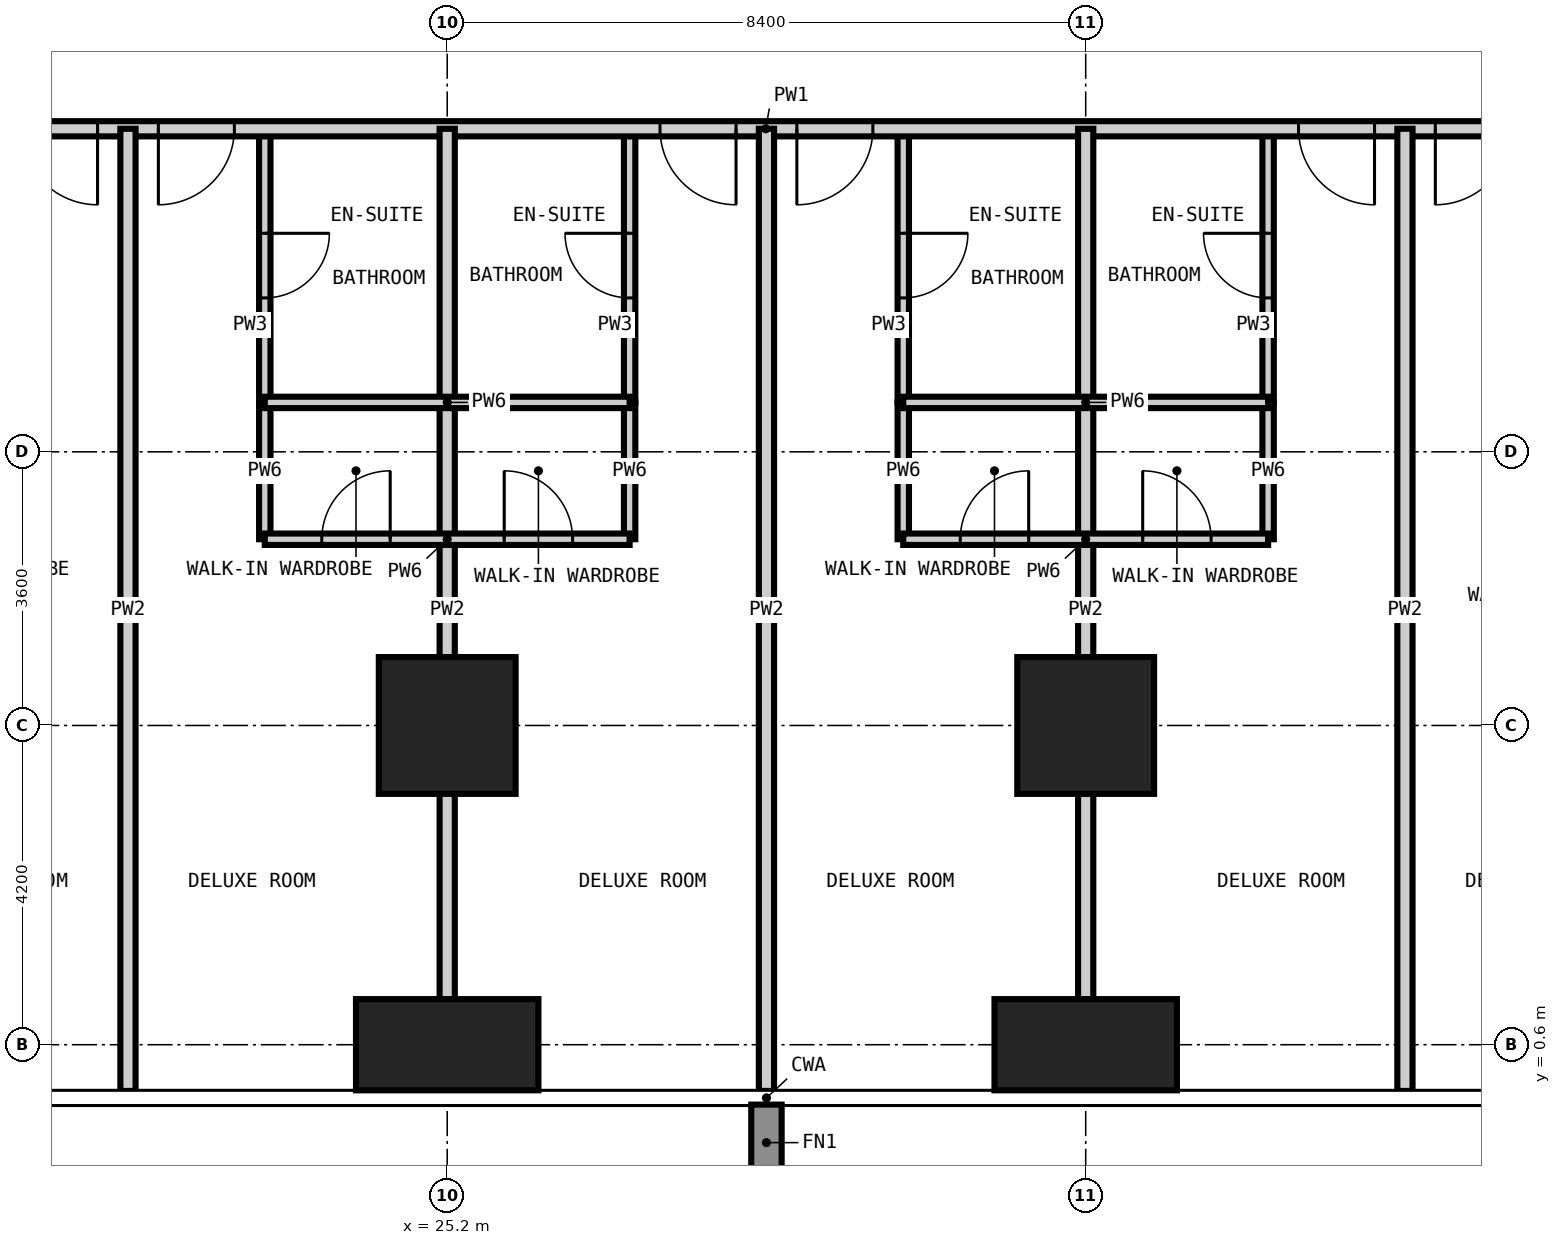
"""IFC4 building model, lengths in metres.
Left out: names, types, materials, properties, quantities, classifications, styles, units other than length and angle.
Written with IfcOpenShell. Run it as: python <this file> out.ifc"""

import sys

from ifc_helpers import new_model, si_unit, direction, frame, frame_2d, origin, origin_2d, place, context, subcontext, project, spatial, rectangle, extrude, element, fill, save


model = new_model("IFC4")
c1 = context("Model", 3, precision=1e-05, world=origin(), true_north=direction((0.0, 1.0)))
c2 = subcontext(c1, "Body", "Model", "MODEL_VIEW")
j1 = project(units=[si_unit("LENGTHUNIT", "METRE"), si_unit("PLANEANGLEUNIT", "RADIAN")], contexts=[c1])
p1 = place(None, origin())
s1 = spatial("IfcSite", under=j1, at=p1, CompositionType="ELEMENT")
p2 = place(p1, origin())
s2 = spatial("IfcBuilding", under=s1, at=p2, CompositionType="ELEMENT")
p3 = place(p2, frame((0.0, 0.0, 70.2)))
s3 = spatial("IfcBuildingStorey", under=s2, at=p3, CompositionType="ELEMENT", Elevation=70.2)
p4 = place(p3, frame((25.2, 0.6, -0.35), z_axis=(0.0, 0.0, 1.0), x_axis=(1.0, 0.0, 0.0)))
e1 = element("IfcColumn", 1, at=p4, inside=s3, PredefinedType="COLUMN", context=c2, shape_type="SweptSolid", body=[
    extrude(rectangle(XDim=2.4, YDim=1.2, at=origin_2d()), origin(), (0.0, 0.0, 1.0), 3.6),
])
p5 = place(p3, frame((25.2, 4.8, -0.35), z_axis=(0.0, 0.0, 1.0), x_axis=(1.0, 0.0, 0.0)))
e2 = element("IfcColumn", 2, at=p5, inside=s3, PredefinedType="COLUMN", context=c2, shape_type="SweptSolid", body=[
    extrude(rectangle(XDim=1.8, YDim=1.8, at=origin_2d()), origin(), (0.0, 0.0, 1.0), 3.6),
])
p6 = place(p3, frame((33.6, 0.6, -0.35), z_axis=(0.0, 0.0, 1.0), x_axis=(1.0, 0.0, 0.0)))
e3 = element("IfcColumn", 3, at=p6, inside=s3, PredefinedType="COLUMN", context=c2, shape_type="SweptSolid", body=[
    extrude(rectangle(XDim=2.4, YDim=1.2, at=origin_2d()), origin(), (0.0, 0.0, 1.0), 3.6),
])
p7 = place(p3, frame((33.6, 4.8, -0.35), z_axis=(0.0, 0.0, 1.0), x_axis=(1.0, 0.0, 0.0)))
e4 = element("IfcColumn", 4, at=p7, inside=s3, PredefinedType="COLUMN", context=c2, shape_type="SweptSolid", body=[
    extrude(rectangle(XDim=1.8, YDim=1.8, at=origin_2d()), origin(), (0.0, 0.0, 1.0), 3.6),
])
p8 = place(p3, frame((22.8, 9.05, 0.0), z_axis=(0.0, 0.0, 1.0), x_axis=(0.0, 1.0, 0.0)))
e5 = element("IfcWall", 5, at=p8, inside=s3, PredefinedType="PARTITIONING", context=c2, shape_type="SweptSolid", body=[
    extrude(rectangle(XDim=3.6, YDim=0.15, at=frame_2d((1.8, 0.0))), origin(), (0.0, 0.0, 1.0), 3.25),
])
p9 = place(p8, frame((1.375, 0.0, 0.0)))
e6 = element("IfcOpeningElement", 6, at=p9, cuts=e5, PredefinedType="OPENING", context=c2, shape_type="SweptSolid", body=[
    extrude(rectangle(XDim=0.85, YDim=2.1, at=frame_2d((0.425, 1.05))), frame((0.0, 0.085, 0.0), z_axis=(0.0, -1.0, 0.0), x_axis=(1.0, 0.0, 0.0)), (0.0, 0.0, 1.0), 0.17),
])
p10 = place(p3, frame((27.6, 9.05, 0.0), z_axis=(0.0, 0.0, 1.0), x_axis=(0.0, 1.0, 0.0)))
e7 = element("IfcWall", 7, at=p10, inside=s3, PredefinedType="PARTITIONING", context=c2, shape_type="SweptSolid", body=[
    extrude(rectangle(XDim=3.6, YDim=0.15, at=frame_2d((1.8, 0.0))), origin(), (0.0, 0.0, 1.0), 3.25),
])
p11 = place(p10, frame((1.375, 0.0, 0.0)))
e8 = element("IfcOpeningElement", 8, at=p11, cuts=e7, PredefinedType="OPENING", context=c2, shape_type="SweptSolid", body=[
    extrude(rectangle(XDim=0.85, YDim=2.1, at=frame_2d((0.425, 1.05))), frame((0.0, 0.085, 0.0), z_axis=(0.0, -1.0, 0.0), x_axis=(1.0, 0.0, 0.0)), (0.0, 0.0, 1.0), 0.17),
])
p12 = place(p3, frame((31.2, 9.05, 0.0), z_axis=(0.0, 0.0, 1.0), x_axis=(0.0, 1.0, 0.0)))
e9 = element("IfcWall", 9, at=p12, inside=s3, PredefinedType="PARTITIONING", context=c2, shape_type="SweptSolid", body=[
    extrude(rectangle(XDim=3.6, YDim=0.15, at=frame_2d((1.8, 0.0))), origin(), (0.0, 0.0, 1.0), 3.25),
])
p13 = place(p12, frame((1.375, 0.0, 0.0)))
e10 = element("IfcOpeningElement", 10, at=p13, cuts=e9, PredefinedType="OPENING", context=c2, shape_type="SweptSolid", body=[
    extrude(rectangle(XDim=0.85, YDim=2.1, at=frame_2d((0.425, 1.05))), frame((0.0, 0.085, 0.0), z_axis=(0.0, -1.0, 0.0), x_axis=(1.0, 0.0, 0.0)), (0.0, 0.0, 1.0), 0.17),
])
p14 = place(p3, frame((36.0, 9.05, 0.0), z_axis=(0.0, 0.0, 1.0), x_axis=(0.0, 1.0, 0.0)))
e11 = element("IfcWall", 11, at=p14, inside=s3, PredefinedType="PARTITIONING", context=c2, shape_type="SweptSolid", body=[
    extrude(rectangle(XDim=3.6, YDim=0.15, at=frame_2d((1.8, 0.0))), origin(), (0.0, 0.0, 1.0), 3.25),
])
p15 = place(p14, frame((1.375, 0.0, 0.0)))
e12 = element("IfcOpeningElement", 12, at=p15, cuts=e11, PredefinedType="OPENING", context=c2, shape_type="SweptSolid", body=[
    extrude(rectangle(XDim=0.85, YDim=2.1, at=frame_2d((0.425, 1.05))), frame((0.0, 0.085, 0.0), z_axis=(0.0, -1.0, 0.0), x_axis=(1.0, 0.0, 0.0)), (0.0, 0.0, 1.0), 0.17),
])
p16 = place(p3, frame((44.95, 12.65, 0.0), z_axis=(0.0, 0.0, 1.0), x_axis=(-1.0, 0.0, 0.0)))
e13 = element("IfcWall", 13, at=p16, inside=s3, PredefinedType="PARTITIONING", context=c2, shape_type="SweptSolid", body=[
    extrude(rectangle(XDim=32.3, YDim=0.2, at=frame_2d((16.15, 0.0))), origin(), (0.0, 0.0, 1.0), 3.25),
])
p17 = place(p16, frame((24.35, 0.0, 0.0)))
e14 = element("IfcOpeningElement", 14, at=p17, cuts=e13, PredefinedType="OPENING", context=c2, shape_type="SweptSolid", body=[
    extrude(rectangle(XDim=1.0, YDim=2.2, at=frame_2d((0.5, 1.1))), frame((0.0, 0.11, 0.0), z_axis=(0.0, -1.0, 0.0), x_axis=(1.0, 0.0, 0.0)), (0.0, 0.0, 1.0), 0.22),
])
p18 = place(p16, frame((22.55, 0.0, 0.0)))
e15 = element("IfcOpeningElement", 15, at=p18, cuts=e13, PredefinedType="OPENING", context=c2, shape_type="SweptSolid", body=[
    extrude(rectangle(XDim=1.0, YDim=2.2, at=frame_2d((0.5, 1.1))), frame((0.0, 0.11, 0.0), z_axis=(0.0, -1.0, 0.0), x_axis=(1.0, 0.0, 0.0)), (0.0, 0.0, 1.0), 0.22),
])
p19 = place(p16, frame((15.95, 0.0, 0.0)))
e16 = element("IfcOpeningElement", 16, at=p19, cuts=e13, PredefinedType="OPENING", context=c2, shape_type="SweptSolid", body=[
    extrude(rectangle(XDim=1.0, YDim=2.2, at=frame_2d((0.5, 1.1))), frame((0.0, 0.11, 0.0), z_axis=(0.0, -1.0, 0.0), x_axis=(1.0, 0.0, 0.0)), (0.0, 0.0, 1.0), 0.22),
])
p20 = place(p16, frame((14.15, 0.0, 0.0)))
e17 = element("IfcOpeningElement", 17, at=p20, cuts=e13, PredefinedType="OPENING", context=c2, shape_type="SweptSolid", body=[
    extrude(rectangle(XDim=1.0, YDim=2.2, at=frame_2d((0.5, 1.1))), frame((0.0, 0.11, 0.0), z_axis=(0.0, -1.0, 0.0), x_axis=(1.0, 0.0, 0.0)), (0.0, 0.0, 1.0), 0.22),
])
p21 = place(p16, frame((7.55, 0.0, 0.0)))
e18 = element("IfcOpeningElement", 18, at=p21, cuts=e13, PredefinedType="OPENING", context=c2, shape_type="SweptSolid", body=[
    extrude(rectangle(XDim=1.0, YDim=2.2, at=frame_2d((0.5, 1.1))), frame((0.0, 0.11, 0.0), z_axis=(0.0, -1.0, 0.0), x_axis=(1.0, 0.0, 0.0)), (0.0, 0.0, 1.0), 0.22),
])
p22 = place(p16, frame((5.75, 0.0, 0.0)))
e19 = element("IfcOpeningElement", 19, at=p22, cuts=e13, PredefinedType="OPENING", context=c2, shape_type="SweptSolid", body=[
    extrude(rectangle(XDim=1.0, YDim=2.2, at=frame_2d((0.5, 1.1))), frame((0.0, 0.11, 0.0), z_axis=(0.0, -1.0, 0.0), x_axis=(1.0, 0.0, 0.0)), (0.0, 0.0, 1.0), 0.22),
])
for number, where, z_axis, x_axis in (
    (20, (21.0, -0.008, 0.0), (0.0, 0.0, 1.0), (0.0, 1.0, 0.0)),
    (21, (25.2, -0.008, 0.0), (0.0, 0.0, 1.0), (0.0, 1.0, 0.0)),
    (22, (29.4, -0.008, 0.0), (0.0, 0.0, 1.0), (0.0, 1.0, 0.0)),
    (23, (33.6, -0.008, 0.0), (0.0, 0.0, 1.0), (0.0, 1.0, 0.0)),
    (24, (37.8, -0.008, 0.0), (0.0, 0.0, 1.0), (0.0, 1.0, 0.0)),
):
    element("IfcWall", number, at=place(p3, frame(where, z_axis=z_axis, x_axis=x_axis)), inside=s3, PredefinedType="PARTITIONING", context=c2, shape_type="SweptSolid", body=[
        extrude(rectangle(XDim=12.658, YDim=0.2, at=frame_2d((6.329, 0.0))), origin(), (0.0, 0.0, 1.0), 3.25),
    ])
for number, where, z_axis, x_axis in (
    (25, (22.8, 7.25, 0.0), (0.0, 0.0, 1.0), (0.0, 1.0, 0.0)),
    (26, (27.6, 7.25, 0.0), (0.0, 0.0, 1.0), (0.0, 1.0, 0.0)),
    (27, (31.2, 7.25, 0.0), (0.0, 0.0, 1.0), (0.0, 1.0, 0.0)),
    (28, (36.0, 7.25, 0.0), (0.0, 0.0, 1.0), (0.0, 1.0, 0.0)),
):
    element("IfcWall", number, at=place(p3, frame(where, z_axis=z_axis, x_axis=x_axis)), inside=s3, PredefinedType="PARTITIONING", context=c2, shape_type="SweptSolid", body=[
        extrude(rectangle(XDim=1.8, YDim=0.15, at=frame_2d((0.9, 0.0))), origin(), (0.0, 0.0, 1.0), 3.25),
    ])
p23 = place(p3, frame((22.8, 7.25, 0.0), z_axis=(0.0, 0.0, 1.0), x_axis=(1.0, 0.0, 0.0)))
e29 = element("IfcWall", 29, at=p23, inside=s3, PredefinedType="PARTITIONING", context=c2, shape_type="SweptSolid", body=[
    extrude(rectangle(XDim=4.8, YDim=0.15, at=frame_2d((2.4, 0.0))), origin(), (0.0, 0.0, 1.0), 3.25),
])
p24 = place(p23, frame((0.75, 0.0, 0.0)))
e30 = element("IfcOpeningElement", 30, at=p24, cuts=e29, PredefinedType="OPENING", context=c2, shape_type="SweptSolid", body=[
    extrude(rectangle(XDim=0.9, YDim=2.1, at=frame_2d((0.45, 1.05))), frame((0.0, 0.085, 0.0), z_axis=(0.0, -1.0, 0.0), x_axis=(1.0, 0.0, 0.0)), (0.0, 0.0, 1.0), 0.17),
])
p25 = place(p23, frame((3.15, 0.0, 0.0)))
e31 = element("IfcOpeningElement", 31, at=p25, cuts=e29, PredefinedType="OPENING", context=c2, shape_type="SweptSolid", body=[
    extrude(rectangle(XDim=0.9, YDim=2.1, at=frame_2d((0.45, 1.05))), frame((0.0, 0.085, 0.0), z_axis=(0.0, -1.0, 0.0), x_axis=(1.0, 0.0, 0.0)), (0.0, 0.0, 1.0), 0.17),
])
p26 = place(p3, frame((31.2, 7.25, 0.0), z_axis=(0.0, 0.0, 1.0), x_axis=(1.0, 0.0, 0.0)))
e32 = element("IfcWall", 32, at=p26, inside=s3, PredefinedType="PARTITIONING", context=c2, shape_type="SweptSolid", body=[
    extrude(rectangle(XDim=4.8, YDim=0.15, at=frame_2d((2.4, 0.0))), origin(), (0.0, 0.0, 1.0), 3.25),
])
p27 = place(p26, frame((0.75, 0.0, 0.0)))
e33 = element("IfcOpeningElement", 33, at=p27, cuts=e32, PredefinedType="OPENING", context=c2, shape_type="SweptSolid", body=[
    extrude(rectangle(XDim=0.9, YDim=2.1, at=frame_2d((0.45, 1.05))), frame((0.0, 0.085, 0.0), z_axis=(0.0, -1.0, 0.0), x_axis=(1.0, 0.0, 0.0)), (0.0, 0.0, 1.0), 0.17),
])
p28 = place(p26, frame((3.15, 0.0, 0.0)))
e34 = element("IfcOpeningElement", 34, at=p28, cuts=e32, PredefinedType="OPENING", context=c2, shape_type="SweptSolid", body=[
    extrude(rectangle(XDim=0.9, YDim=2.1, at=frame_2d((0.45, 1.05))), frame((0.0, 0.085, 0.0), z_axis=(0.0, -1.0, 0.0), x_axis=(1.0, 0.0, 0.0)), (0.0, 0.0, 1.0), 0.17),
])
for number, where, z_axis, x_axis in (
    (35, (22.8, 9.05, 0.0), (0.0, 0.0, 1.0), (1.0, 0.0, 0.0)),
    (36, (31.2, 9.05, 0.0), (0.0, 0.0, 1.0), (1.0, 0.0, 0.0)),
):
    element("IfcWall", number, at=place(p3, frame(where, z_axis=z_axis, x_axis=x_axis)), inside=s3, PredefinedType="PARTITIONING", context=c2, shape_type="SweptSolid", body=[
        extrude(rectangle(XDim=4.8, YDim=0.15, at=frame_2d((2.4, 0.0))), origin(), (0.0, 0.0, 1.0), 3.25),
    ])
p29 = place(p17, origin())
e37 = element("IfcDoor", 37, at=p29, inside=s3, OperationType="SINGLE_SWING_LEFT", PredefinedType="DOOR", context=c2, shape_type="SweptSolid", body=[
    extrude(rectangle(XDim=1.0, YDim=2.2, at=frame_2d((0.5, 1.1))), frame((0.0, 0.025, 0.0), z_axis=(0.0, -1.0, 0.0), x_axis=(1.0, 0.0, 0.0)), (0.0, 0.0, 1.0), 0.05),
])
fill(e14, e37)
p30 = place(p18, origin())
e38 = element("IfcDoor", 38, at=p30, inside=s3, OperationType="SINGLE_SWING_RIGHT", PredefinedType="DOOR", context=c2, shape_type="SweptSolid", body=[
    extrude(rectangle(XDim=1.0, YDim=2.2, at=frame_2d((0.5, 1.1))), frame((0.0, 0.025, 0.0), z_axis=(0.0, -1.0, 0.0), x_axis=(1.0, 0.0, 0.0)), (0.0, 0.0, 1.0), 0.05),
])
fill(e15, e38)
p31 = place(p9, frame((0.85, 0.0, 0.0), z_axis=(0.0, 0.0, 1.0), x_axis=(-1.0, 0.0, 0.0)))
e39 = element("IfcDoor", 39, at=p31, inside=s3, OperationType="SINGLE_SWING_LEFT", PredefinedType="DOOR", context=c2, shape_type="SweptSolid", body=[
    extrude(rectangle(XDim=0.85, YDim=2.1, at=frame_2d((0.425, 1.05))), frame((0.0, 0.025, 0.0), z_axis=(0.0, -1.0, 0.0), x_axis=(1.0, 0.0, 0.0)), (0.0, 0.0, 1.0), 0.05),
])
fill(e6, e39)
p32 = place(p24, origin())
e40 = element("IfcDoor", 40, at=p32, inside=s3, OperationType="SINGLE_SWING_RIGHT", PredefinedType="DOOR", context=c2, shape_type="SweptSolid", body=[
    extrude(rectangle(XDim=0.9, YDim=2.1, at=frame_2d((0.45, 1.05))), frame((0.0, 0.025, 0.0), z_axis=(0.0, -1.0, 0.0), x_axis=(1.0, 0.0, 0.0)), (0.0, 0.0, 1.0), 0.05),
])
fill(e30, e40)
p33 = place(p19, origin())
e41 = element("IfcDoor", 41, at=p33, inside=s3, OperationType="SINGLE_SWING_LEFT", PredefinedType="DOOR", context=c2, shape_type="SweptSolid", body=[
    extrude(rectangle(XDim=1.0, YDim=2.2, at=frame_2d((0.5, 1.1))), frame((0.0, 0.025, 0.0), z_axis=(0.0, -1.0, 0.0), x_axis=(1.0, 0.0, 0.0)), (0.0, 0.0, 1.0), 0.05),
])
fill(e16, e41)
p34 = place(p11, origin())
e42 = element("IfcDoor", 42, at=p34, inside=s3, OperationType="SINGLE_SWING_RIGHT", PredefinedType="DOOR", context=c2, shape_type="SweptSolid", body=[
    extrude(rectangle(XDim=0.85, YDim=2.1, at=frame_2d((0.425, 1.05))), frame((0.0, 0.025, 0.0), z_axis=(0.0, -1.0, 0.0), x_axis=(1.0, 0.0, 0.0)), (0.0, 0.0, 1.0), 0.05),
])
fill(e8, e42)
p35 = place(p25, origin())
e43 = element("IfcDoor", 43, at=p35, inside=s3, OperationType="SINGLE_SWING_LEFT", PredefinedType="DOOR", context=c2, shape_type="SweptSolid", body=[
    extrude(rectangle(XDim=0.9, YDim=2.1, at=frame_2d((0.45, 1.05))), frame((0.0, 0.025, 0.0), z_axis=(0.0, -1.0, 0.0), x_axis=(1.0, 0.0, 0.0)), (0.0, 0.0, 1.0), 0.05),
])
fill(e31, e43)
p36 = place(p20, origin())
e44 = element("IfcDoor", 44, at=p36, inside=s3, OperationType="SINGLE_SWING_RIGHT", PredefinedType="DOOR", context=c2, shape_type="SweptSolid", body=[
    extrude(rectangle(XDim=1.0, YDim=2.2, at=frame_2d((0.5, 1.1))), frame((0.0, 0.025, 0.0), z_axis=(0.0, -1.0, 0.0), x_axis=(1.0, 0.0, 0.0)), (0.0, 0.0, 1.0), 0.05),
])
fill(e17, e44)
p37 = place(p13, frame((0.85, 0.0, 0.0), z_axis=(0.0, 0.0, 1.0), x_axis=(-1.0, 0.0, 0.0)))
e45 = element("IfcDoor", 45, at=p37, inside=s3, OperationType="SINGLE_SWING_LEFT", PredefinedType="DOOR", context=c2, shape_type="SweptSolid", body=[
    extrude(rectangle(XDim=0.85, YDim=2.1, at=frame_2d((0.425, 1.05))), frame((0.0, 0.025, 0.0), z_axis=(0.0, -1.0, 0.0), x_axis=(1.0, 0.0, 0.0)), (0.0, 0.0, 1.0), 0.05),
])
fill(e10, e45)
p38 = place(p27, origin())
e46 = element("IfcDoor", 46, at=p38, inside=s3, OperationType="SINGLE_SWING_RIGHT", PredefinedType="DOOR", context=c2, shape_type="SweptSolid", body=[
    extrude(rectangle(XDim=0.9, YDim=2.1, at=frame_2d((0.45, 1.05))), frame((0.0, 0.025, 0.0), z_axis=(0.0, -1.0, 0.0), x_axis=(1.0, 0.0, 0.0)), (0.0, 0.0, 1.0), 0.05),
])
fill(e33, e46)
p39 = place(p21, origin())
e47 = element("IfcDoor", 47, at=p39, inside=s3, OperationType="SINGLE_SWING_LEFT", PredefinedType="DOOR", context=c2, shape_type="SweptSolid", body=[
    extrude(rectangle(XDim=1.0, YDim=2.2, at=frame_2d((0.5, 1.1))), frame((0.0, 0.025, 0.0), z_axis=(0.0, -1.0, 0.0), x_axis=(1.0, 0.0, 0.0)), (0.0, 0.0, 1.0), 0.05),
])
fill(e18, e47)
p40 = place(p15, origin())
e48 = element("IfcDoor", 48, at=p40, inside=s3, OperationType="SINGLE_SWING_RIGHT", PredefinedType="DOOR", context=c2, shape_type="SweptSolid", body=[
    extrude(rectangle(XDim=0.85, YDim=2.1, at=frame_2d((0.425, 1.05))), frame((0.0, 0.025, 0.0), z_axis=(0.0, -1.0, 0.0), x_axis=(1.0, 0.0, 0.0)), (0.0, 0.0, 1.0), 0.05),
])
fill(e12, e48)
p41 = place(p28, origin())
e49 = element("IfcDoor", 49, at=p41, inside=s3, OperationType="SINGLE_SWING_LEFT", PredefinedType="DOOR", context=c2, shape_type="SweptSolid", body=[
    extrude(rectangle(XDim=0.9, YDim=2.1, at=frame_2d((0.45, 1.05))), frame((0.0, 0.025, 0.0), z_axis=(0.0, -1.0, 0.0), x_axis=(1.0, 0.0, 0.0)), (0.0, 0.0, 1.0), 0.05),
])
fill(e34, e49)
p42 = place(p22, origin())
e50 = element("IfcDoor", 50, at=p42, inside=s3, OperationType="SINGLE_SWING_RIGHT", PredefinedType="DOOR", context=c2, shape_type="SweptSolid", body=[
    extrude(rectangle(XDim=1.0, YDim=2.2, at=frame_2d((0.5, 1.1))), frame((0.0, 0.025, 0.0), z_axis=(0.0, -1.0, 0.0), x_axis=(1.0, 0.0, 0.0)), (0.0, 0.0, 1.0), 0.05),
])
fill(e19, e50)
save(model, sys.argv[1])
